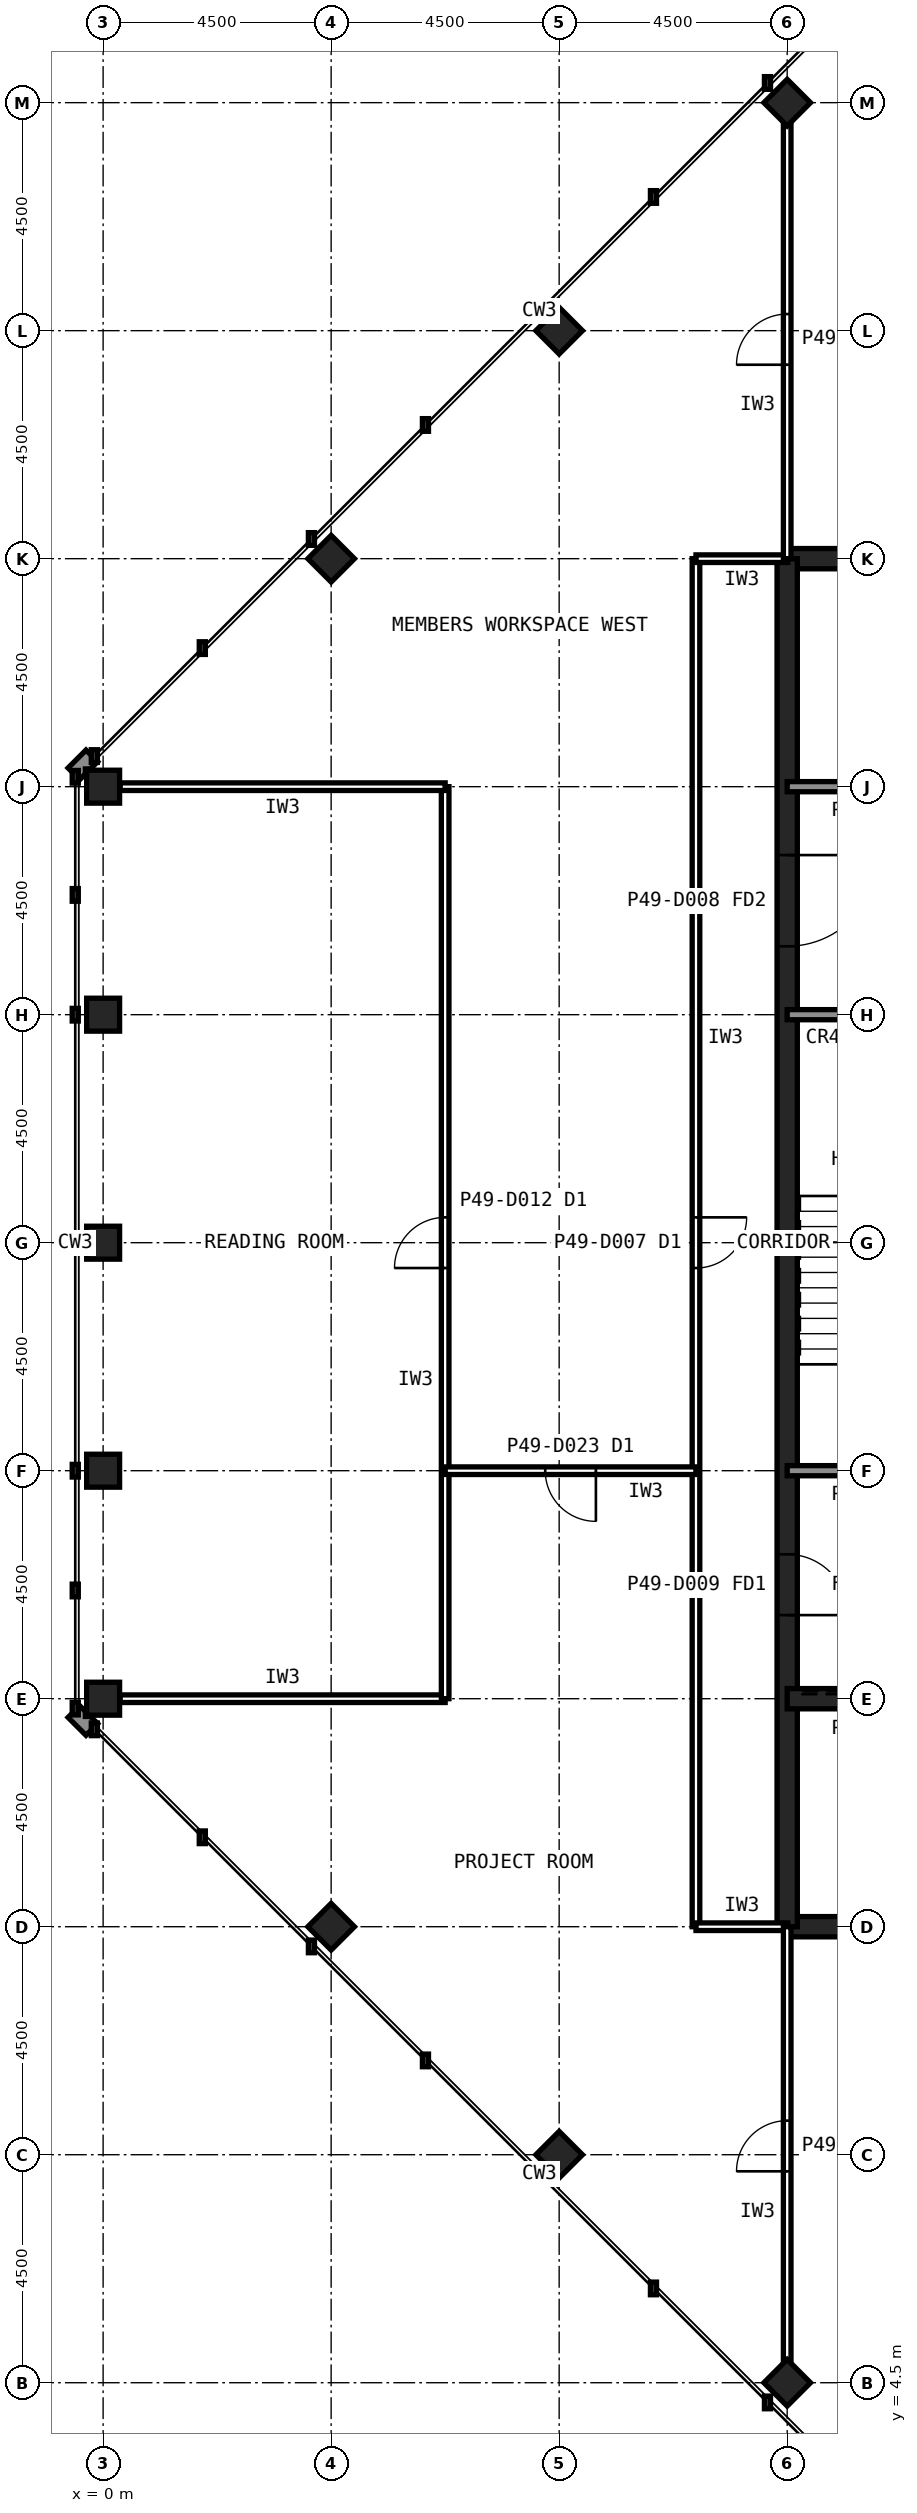
"""IFC4 building model, lengths in metres.
Left out: names, types, materials, properties, quantities, classifications, styles, units other than length and angle.
Written with IfcOpenShell. Run it as: python <this file> out.ifc"""

import sys

from ifc_helpers import new_model, si_unit, direction, frame, frame_2d, origin, origin_2d, place, context, subcontext, project, spatial, rectangle, hollow_rectangle, extrude, element, fill, save


model = new_model("IFC4")
c1 = context("Model", 3, precision=1e-05, world=origin(), true_north=direction((0.0, 1.0)))
c2 = subcontext(c1, "Body", "Model", "MODEL_VIEW")
j1 = project(units=[si_unit("LENGTHUNIT", "METRE"), si_unit("PLANEANGLEUNIT", "RADIAN")], contexts=[c1])
p1 = place(None, origin())
s1 = spatial("IfcSite", under=j1, at=p1, CompositionType="ELEMENT")
p2 = place(p1, origin())
s2 = spatial("IfcBuilding", under=s1, at=p2, CompositionType="ELEMENT")
p3 = place(p2, frame((0.0, 0.0, 210.6)))
s3 = spatial("IfcBuildingStorey", under=s2, at=p3, CompositionType="ELEMENT", Elevation=210.6)
for number, where, z_axis, x_axis in (
    (1, (0.0, 36.0, 0.0), (0.0, 0.0, 1.0), (1.0, 0.0, 0.0)),
    (2, (0.0, 31.5, 0.0), (0.0, 0.0, 1.0), (1.0, 0.0, 0.0)),
    (3, (0.0, 27.0, 0.0), (0.0, 0.0, 1.0), (1.0, 0.0, 0.0)),
    (4, (0.0, 22.5, 0.0), (0.0, 0.0, 1.0), (1.0, 0.0, 0.0)),
    (5, (0.0, 18.0, 0.0), (0.0, 0.0, 1.0), (1.0, 0.0, 0.0)),
    (6, (13.5, 4.5, 0.0), (0.0, 0.0, 1.0), (0.707, 0.707, 0.0)),
    (7, (9.0, 9.0, 0.0), (0.0, 0.0, 1.0), (0.707, 0.707, 0.0)),
    (8, (4.5, 13.5, 0.0), (0.0, 0.0, 1.0), (0.707, 0.707, 0.0)),
    (9, (4.5, 40.5, 0.0), (0.0, 0.0, 1.0), (0.707, 0.707, 0.0)),
    (10, (9.0, 45.0, 0.0), (0.0, 0.0, 1.0), (0.707, 0.707, 0.0)),
    (11, (13.5, 49.5, 0.0), (0.0, 0.0, 1.0), (0.707, 0.707, 0.0)),
):
    element("IfcColumn", number, at=place(p3, frame(where, z_axis=z_axis, x_axis=x_axis)), inside=s3, PredefinedType="COLUMN", context=c2, shape_type="SweptSolid", body=[
        extrude(hollow_rectangle(XDim=0.65, YDim=0.65, WallThickness=0.032, at=origin_2d()), origin(), (0.0, 0.0, 1.0), 4.0),
    ])
for number, where, z_axis, x_axis in (
    (12, (13.5, 13.5, 0.0), (0.0, 0.0, 1.0), (1.0, 0.0, 0.0)),
    (13, (40.5, 40.5, 0.0), (0.0, 0.0, 1.0), (-1.0, 0.0, 0.0)),
):
    element("IfcWall", number, at=place(p3, frame(where, z_axis=z_axis, x_axis=x_axis)), inside=s3, PredefinedType="SHEAR", context=c2, shape_type="SweptSolid", body=[
        extrude(rectangle(XDim=27.0, YDim=0.4, at=frame_2d((13.5, 0.0))), origin(), (0.0, 0.0, 1.0), 4.0),
    ])
p4 = place(p3, frame((13.5, 40.5, 0.0), z_axis=(0.0, 0.0, 1.0), x_axis=(0.0, -1.0, 0.0)))
e14 = element("IfcWall", 14, at=p4, inside=s3, PredefinedType="SHEAR", context=c2, shape_type="SweptSolid", body=[
    extrude(rectangle(XDim=27.0, YDim=0.4, at=frame_2d((13.5, 0.0))), origin(), (0.0, 0.0, 1.0), 4.0),
])
p5 = place(p4, frame((19.65, 0.0, 0.0)))
e15 = element("IfcOpeningElement", 15, at=p5, cuts=e14, PredefinedType="OPENING", context=c2, shape_type="SweptSolid", body=[
    extrude(rectangle(XDim=1.2, YDim=2.1, at=frame_2d((0.6, 1.05))), frame((0.0, 0.21, 0.0), z_axis=(0.0, -1.0, 0.0), x_axis=(1.0, 0.0, 0.0)), (0.0, 0.0, 1.0), 0.42),
])
p6 = place(p4, frame((5.85, 0.0, 0.0)))
e16 = element("IfcOpeningElement", 16, at=p6, cuts=e14, PredefinedType="OPENING", context=c2, shape_type="SweptSolid", body=[
    extrude(rectangle(XDim=1.8, YDim=2.1, at=frame_2d((0.9, 1.05))), frame((0.0, 0.21, 0.0), z_axis=(0.0, -1.0, 0.0), x_axis=(1.0, 0.0, 0.0)), (0.0, 0.0, 1.0), 0.42),
])
p7 = place(p3, frame((13.5, 18.0, 0.0), z_axis=(0.0, 0.0, 1.0), x_axis=(1.0, 0.0, 0.0)))
e17 = element("IfcWall", 17, at=p7, inside=s3, PredefinedType="SHEAR", context=c2, shape_type="SweptSolid", body=[
    extrude(rectangle(XDim=27.0, YDim=0.4, at=frame_2d((13.5, 0.0))), origin(), (0.0, 0.0, 1.0), 4.0),
])
p8 = place(p7, frame((24.3, 0.0, 0.0)))
e18 = element("IfcOpeningElement", 18, at=p8, cuts=e17, PredefinedType="OPENING", context=c2, shape_type="SweptSolid", body=[
    extrude(rectangle(XDim=0.9, YDim=2.1, at=frame_2d((0.45, 1.05))), frame((0.0, 0.21, 0.0), z_axis=(0.0, -1.0, 0.0), x_axis=(1.0, 0.0, 0.0)), (0.0, 0.0, 1.0), 0.42),
])
p9 = place(p7, frame((5.45, 0.0, 0.0)))
e19 = element("IfcOpeningElement", 19, at=p9, cuts=e17, PredefinedType="OPENING", context=c2, shape_type="SweptSolid", body=[
    extrude(rectangle(XDim=1.1, YDim=2.1, at=frame_2d((0.55, 1.05))), frame((0.0, 0.21, 0.0), z_axis=(0.0, -1.0, 0.0), x_axis=(1.0, 0.0, 0.0)), (0.0, 0.0, 1.0), 0.42),
])
p10 = place(p7, frame((8.45, 0.0, 0.0)))
e20 = element("IfcOpeningElement", 20, at=p10, cuts=e17, PredefinedType="OPENING", context=c2, shape_type="SweptSolid", body=[
    extrude(rectangle(XDim=1.1, YDim=2.1, at=frame_2d((0.55, 1.05))), frame((0.0, 0.21, 0.0), z_axis=(0.0, -1.0, 0.0), x_axis=(1.0, 0.0, 0.0)), (0.0, 0.0, 1.0), 0.42),
])
p11 = place(p7, frame((11.45, 0.0, 0.0)))
e21 = element("IfcOpeningElement", 21, at=p11, cuts=e17, PredefinedType="OPENING", context=c2, shape_type="SweptSolid", body=[
    extrude(rectangle(XDim=1.1, YDim=2.1, at=frame_2d((0.55, 1.05))), frame((0.0, 0.21, 0.0), z_axis=(0.0, -1.0, 0.0), x_axis=(1.0, 0.0, 0.0)), (0.0, 0.0, 1.0), 0.42),
])
p12 = place(p7, frame((14.45, 0.0, 0.0)))
e22 = element("IfcOpeningElement", 22, at=p12, cuts=e17, PredefinedType="OPENING", context=c2, shape_type="SweptSolid", body=[
    extrude(rectangle(XDim=1.1, YDim=2.1, at=frame_2d((0.55, 1.05))), frame((0.0, 0.21, 0.0), z_axis=(0.0, -1.0, 0.0), x_axis=(1.0, 0.0, 0.0)), (0.0, 0.0, 1.0), 0.42),
])
p13 = place(p7, frame((17.45, 0.0, 0.0)))
e23 = element("IfcOpeningElement", 23, at=p13, cuts=e17, PredefinedType="OPENING", context=c2, shape_type="SweptSolid", body=[
    extrude(rectangle(XDim=1.1, YDim=2.1, at=frame_2d((0.55, 1.05))), frame((0.0, 0.21, 0.0), z_axis=(0.0, -1.0, 0.0), x_axis=(1.0, 0.0, 0.0)), (0.0, 0.0, 1.0), 0.42),
])
p14 = place(p7, frame((20.45, 0.0, 0.0)))
e24 = element("IfcOpeningElement", 24, at=p14, cuts=e17, PredefinedType="OPENING", context=c2, shape_type="SweptSolid", body=[
    extrude(rectangle(XDim=1.1, YDim=2.1, at=frame_2d((0.55, 1.05))), frame((0.0, 0.21, 0.0), z_axis=(0.0, -1.0, 0.0), x_axis=(1.0, 0.0, 0.0)), (0.0, 0.0, 1.0), 0.42),
])
p15 = place(p7, frame((1.6, 0.0, 0.0)))
e25 = element("IfcOpeningElement", 25, at=p15, cuts=e17, PredefinedType="OPENING", context=c2, shape_type="SweptSolid", body=[
    extrude(rectangle(XDim=1.3, YDim=2.2, at=frame_2d((0.65, 1.1))), frame((0.0, 0.21, 0.0), z_axis=(0.0, -1.0, 0.0), x_axis=(1.0, 0.0, 0.0)), (0.0, 0.0, 1.0), 0.42),
])
p16 = place(p3, frame((13.5, 36.0, 0.0), z_axis=(0.0, 0.0, 1.0), x_axis=(1.0, 0.0, 0.0)))
e26 = element("IfcWall", 26, at=p16, inside=s3, PredefinedType="SOLIDWALL", context=c2, shape_type="SweptSolid", body=[
    extrude(rectangle(XDim=27.0, YDim=0.2, at=frame_2d((13.5, 0.0))), origin(), (0.0, 0.0, 1.0), 3.84),
])
p17 = place(p16, frame((1.8, 0.0, 0.0)))
e27 = element("IfcOpeningElement", 27, at=p17, cuts=e26, PredefinedType="OPENING", context=c2, shape_type="SweptSolid", body=[
    extrude(rectangle(XDim=0.9, YDim=2.1, at=frame_2d((0.45, 1.05))), frame((0.0, 0.11, 0.0), z_axis=(0.0, -1.0, 0.0), x_axis=(1.0, 0.0, 0.0)), (0.0, 0.0, 1.0), 0.22),
])
p18 = place(p16, frame((5.55, 0.0, 0.0)))
e28 = element("IfcOpeningElement", 28, at=p18, cuts=e26, PredefinedType="OPENING", context=c2, shape_type="SweptSolid", body=[
    extrude(rectangle(XDim=0.9, YDim=2.1, at=frame_2d((0.45, 1.05))), frame((0.0, 0.11, 0.0), z_axis=(0.0, -1.0, 0.0), x_axis=(1.0, 0.0, 0.0)), (0.0, 0.0, 1.0), 0.22),
])
p19 = place(p16, frame((8.55, 0.0, 0.0)))
e29 = element("IfcOpeningElement", 29, at=p19, cuts=e26, PredefinedType="OPENING", context=c2, shape_type="SweptSolid", body=[
    extrude(rectangle(XDim=0.9, YDim=2.1, at=frame_2d((0.45, 1.05))), frame((0.0, 0.11, 0.0), z_axis=(0.0, -1.0, 0.0), x_axis=(1.0, 0.0, 0.0)), (0.0, 0.0, 1.0), 0.22),
])
p20 = place(p16, frame((11.55, 0.0, 0.0)))
e30 = element("IfcOpeningElement", 30, at=p20, cuts=e26, PredefinedType="OPENING", context=c2, shape_type="SweptSolid", body=[
    extrude(rectangle(XDim=0.9, YDim=2.1, at=frame_2d((0.45, 1.05))), frame((0.0, 0.11, 0.0), z_axis=(0.0, -1.0, 0.0), x_axis=(1.0, 0.0, 0.0)), (0.0, 0.0, 1.0), 0.22),
])
p21 = place(p16, frame((24.1, 0.0, 0.0)))
e31 = element("IfcOpeningElement", 31, at=p21, cuts=e26, PredefinedType="OPENING", context=c2, shape_type="SweptSolid", body=[
    extrude(rectangle(XDim=1.3, YDim=2.2, at=frame_2d((0.65, 1.1))), frame((0.0, 0.11, 0.0), z_axis=(0.0, -1.0, 0.0), x_axis=(1.0, 0.0, 0.0)), (0.0, 0.0, 1.0), 0.22),
])
p22 = place(p3, frame((13.5, 22.5, 0.0), z_axis=(0.0, 0.0, 1.0), x_axis=(1.0, 0.0, 0.0)))
e32 = element("IfcWall", 32, at=p22, inside=s3, PredefinedType="SOLIDWALL", context=c2, shape_type="SweptSolid", body=[
    extrude(rectangle(XDim=27.0, YDim=0.2, at=frame_2d((13.5, 0.0))), origin(), (0.0, 0.0, 1.0), 3.84),
])
p23 = place(p22, frame((1.65, 0.0, 0.0)))
e33 = element("IfcOpeningElement", 33, at=p23, cuts=e32, PredefinedType="OPENING", context=c2, shape_type="SweptSolid", body=[
    extrude(rectangle(XDim=1.2, YDim=2.1, at=frame_2d((0.6, 1.05))), frame((0.0, 0.11, 0.0), z_axis=(0.0, -1.0, 0.0), x_axis=(1.0, 0.0, 0.0)), (0.0, 0.0, 1.0), 0.22),
])
p24 = place(p22, frame((6.025, 0.0, 0.0)))
e34 = element("IfcOpeningElement", 34, at=p24, cuts=e32, PredefinedType="OPENING", context=c2, shape_type="SweptSolid", body=[
    extrude(rectangle(XDim=1.0, YDim=2.1, at=frame_2d((0.5, 1.05))), frame((0.0, 0.11, 0.0), z_axis=(0.0, -1.0, 0.0), x_axis=(1.0, 0.0, 0.0)), (0.0, 0.0, 1.0), 0.22),
])
p25 = place(p22, frame((10.525, 0.0, 0.0)))
e35 = element("IfcOpeningElement", 35, at=p25, cuts=e32, PredefinedType="OPENING", context=c2, shape_type="SweptSolid", body=[
    extrude(rectangle(XDim=1.0, YDim=2.1, at=frame_2d((0.5, 1.05))), frame((0.0, 0.11, 0.0), z_axis=(0.0, -1.0, 0.0), x_axis=(1.0, 0.0, 0.0)), (0.0, 0.0, 1.0), 0.22),
])
p26 = place(p22, frame((19.75, 0.0, 0.0)))
e36 = element("IfcOpeningElement", 36, at=p26, cuts=e32, PredefinedType="OPENING", context=c2, shape_type="SweptSolid", body=[
    extrude(rectangle(XDim=1.0, YDim=2.1, at=frame_2d((0.5, 1.05))), frame((0.0, 0.11, 0.0), z_axis=(0.0, -1.0, 0.0), x_axis=(1.0, 0.0, 0.0)), (0.0, 0.0, 1.0), 0.22),
])
p27 = place(p22, frame((15.05, 0.0, 0.0)))
e37 = element("IfcOpeningElement", 37, at=p27, cuts=e32, PredefinedType="OPENING", context=c2, shape_type="SweptSolid", body=[
    extrude(rectangle(XDim=1.4, YDim=2.4, at=frame_2d((0.7, 1.2))), frame((0.0, 0.11, 0.0), z_axis=(0.0, -1.0, 0.0), x_axis=(1.0, 0.0, 0.0)), (0.0, 0.0, 1.0), 0.22),
])
p28 = place(p3, frame((13.5, 31.5, 0.0), z_axis=(0.0, 0.0, 1.0), x_axis=(1.0, 0.0, 0.0)))
e38 = element("IfcWall", 38, at=p28, inside=s3, PredefinedType="SOLIDWALL", context=c2, shape_type="SweptSolid", body=[
    extrude(rectangle(XDim=27.0, YDim=0.2, at=frame_2d((13.5, 0.0))), origin(), (0.0, 0.0, 1.0), 3.84),
])
p29 = place(p28, frame((24.15, 0.0, 0.0)))
e39 = element("IfcOpeningElement", 39, at=p29, cuts=e38, PredefinedType="OPENING", context=c2, shape_type="SweptSolid", body=[
    extrude(rectangle(XDim=1.2, YDim=2.1, at=frame_2d((0.6, 1.05))), frame((0.0, 0.11, 0.0), z_axis=(0.0, -1.0, 0.0), x_axis=(1.0, 0.0, 0.0)), (0.0, 0.0, 1.0), 0.22),
])
p30 = place(p28, frame((15.3, 0.0, 0.0)))
e40 = element("IfcOpeningElement", 40, at=p30, cuts=e38, PredefinedType="OPENING", context=c2, shape_type="SweptSolid", body=[
    extrude(rectangle(XDim=0.9, YDim=2.1, at=frame_2d((0.45, 1.05))), frame((0.0, 0.11, 0.0), z_axis=(0.0, -1.0, 0.0), x_axis=(1.0, 0.0, 0.0)), (0.0, 0.0, 1.0), 0.22),
])
p31 = place(p28, frame((19.8, 0.0, 0.0)))
e41 = element("IfcOpeningElement", 41, at=p31, cuts=e38, PredefinedType="OPENING", context=c2, shape_type="SweptSolid", body=[
    extrude(rectangle(XDim=0.9, YDim=2.1, at=frame_2d((0.45, 1.05))), frame((0.0, 0.11, 0.0), z_axis=(0.0, -1.0, 0.0), x_axis=(1.0, 0.0, 0.0)), (0.0, 0.0, 1.0), 0.22),
])
p32 = place(p3, frame((11.7, 40.5, 0.0), z_axis=(0.0, 0.0, 1.0), x_axis=(0.0, -1.0, 0.0)))
e42 = element("IfcWall", 42, at=p32, inside=s3, PredefinedType="PARTITIONING", context=c2, shape_type="SweptSolid", body=[
    extrude(rectangle(XDim=27.0, YDim=0.15, at=frame_2d((13.5, 0.0))), origin(), (0.0, 0.0, 1.0), 3.84),
])
p33 = place(p32, frame((13.0, 0.0, 0.0)))
e43 = element("IfcOpeningElement", 43, at=p33, cuts=e42, PredefinedType="OPENING", context=c2, shape_type="SweptSolid", body=[
    extrude(rectangle(XDim=1.0, YDim=2.1, at=frame_2d((0.5, 1.05))), frame((0.0, 0.085, 0.0), z_axis=(0.0, -1.0, 0.0), x_axis=(1.0, 0.0, 0.0)), (0.0, 0.0, 1.0), 0.17),
])
for number, where, z_axis, x_axis in (
    (44, (11.7, 13.5, 0.0), (0.0, 0.0, 1.0), (1.0, 0.0, 0.0)),
    (45, (13.51, 40.5, 0.0), (0.0, 0.0, 1.0), (-1.0, 0.0, 0.0)),
):
    element("IfcWall", number, at=place(p3, frame(where, z_axis=z_axis, x_axis=x_axis)), inside=s3, PredefinedType="PARTITIONING", context=c2, shape_type="SweptSolid", body=[
        extrude(rectangle(XDim=1.81, YDim=0.15, at=frame_2d((0.905, 0.0))), origin(), (0.0, 0.0, 1.0), 2.989),
    ])
p34 = place(p3, frame((0.335, 18.0, 0.0), z_axis=(0.0, 0.0, 1.0), x_axis=(1.0, 0.0, 0.0)))
e46 = element("IfcWall", 46, at=p34, inside=s3, PredefinedType="PARTITIONING", context=c2, shape_type="SweptSolid", body=[
    extrude(rectangle(XDim=6.415, YDim=0.15, at=frame_2d((3.208, 0.0))), origin(), (0.0, 0.0, 1.0), 2.989),
])
p35 = place(p3, frame((6.75, 18.0, 0.0), z_axis=(0.0, 0.0, 1.0), x_axis=(0.0, 1.0, 0.0)))
e47 = element("IfcWall", 47, at=p35, inside=s3, PredefinedType="PARTITIONING", context=c2, shape_type="SweptSolid", body=[
    extrude(rectangle(XDim=18.0, YDim=0.15, at=frame_2d((9.0, 0.0))), origin(), (0.0, 0.0, 1.0), 3.84),
])
p36 = place(p35, frame((8.5, 0.0, 0.0)))
e48 = element("IfcOpeningElement", 48, at=p36, cuts=e47, PredefinedType="OPENING", context=c2, shape_type="SweptSolid", body=[
    extrude(rectangle(XDim=1.0, YDim=2.1, at=frame_2d((0.5, 1.05))), frame((0.0, 0.085, 0.0), z_axis=(0.0, -1.0, 0.0), x_axis=(1.0, 0.0, 0.0)), (0.0, 0.0, 1.0), 0.17),
])
p37 = place(p3, frame((6.75, 36.0, 0.0), z_axis=(0.0, 0.0, 1.0), x_axis=(-1.0, 0.0, 0.0)))
e49 = element("IfcWall", 49, at=p37, inside=s3, PredefinedType="PARTITIONING", context=c2, shape_type="SweptSolid", body=[
    extrude(rectangle(XDim=6.415, YDim=0.15, at=frame_2d((3.208, 0.0))), origin(), (0.0, 0.0, 1.0), 2.989),
])
p38 = place(p3, frame((13.5, 40.5, 0.0), z_axis=(0.0, 0.0, 1.0), x_axis=(0.0, 1.0, 0.0)))
e50 = element("IfcWall", 50, at=p38, inside=s3, PredefinedType="PARTITIONING", context=c2, shape_type="SweptSolid", body=[
    extrude(rectangle(XDim=8.655, YDim=0.15, at=frame_2d((4.328, 0.0))), origin(), (0.0, 0.0, 1.0), 2.989),
])
p39 = place(p38, frame((3.827, 0.0, 0.0)))
e51 = element("IfcOpeningElement", 51, at=p39, cuts=e50, PredefinedType="OPENING", context=c2, shape_type="SweptSolid", body=[
    extrude(rectangle(XDim=1.0, YDim=2.1, at=frame_2d((0.5, 1.05))), frame((0.0, 0.085, 0.0), z_axis=(0.0, -1.0, 0.0), x_axis=(1.0, 0.0, 0.0)), (0.0, 0.0, 1.0), 0.17),
])
p40 = place(p3, frame((11.7, 22.5, 0.0), z_axis=(0.0, 0.0, 1.0), x_axis=(-1.0, 0.0, 0.0)))
e52 = element("IfcWall", 52, at=p40, inside=s3, PredefinedType="PARTITIONING", context=c2, shape_type="SweptSolid", body=[
    extrude(rectangle(XDim=4.95, YDim=0.15, at=frame_2d((2.475, 0.0))), origin(), (0.0, 0.0, 1.0), 2.989),
])
p41 = place(p40, frame((1.975, 0.0, 0.0)))
e53 = element("IfcOpeningElement", 53, at=p41, cuts=e52, PredefinedType="OPENING", context=c2, shape_type="SweptSolid", body=[
    extrude(rectangle(XDim=1.0, YDim=2.1, at=frame_2d((0.5, 1.05))), frame((0.0, 0.085, 0.0), z_axis=(0.0, -1.0, 0.0), x_axis=(1.0, 0.0, 0.0)), (0.0, 0.0, 1.0), 0.17),
])
p42 = place(p3, frame((13.5, 4.845, 0.0), z_axis=(0.0, 0.0, 1.0), x_axis=(0.0, 1.0, 0.0)))
e54 = element("IfcWall", 54, at=p42, inside=s3, PredefinedType="PARTITIONING", context=c2, shape_type="SweptSolid", body=[
    extrude(rectangle(XDim=8.655, YDim=0.15, at=frame_2d((4.328, 0.0))), origin(), (0.0, 0.0, 1.0), 2.989),
])
p43 = place(p42, frame((3.827, 0.0, 0.0)))
e55 = element("IfcOpeningElement", 55, at=p43, cuts=e54, PredefinedType="OPENING", context=c2, shape_type="SweptSolid", body=[
    extrude(rectangle(XDim=1.0, YDim=2.1, at=frame_2d((0.5, 1.05))), frame((0.0, 0.085, 0.0), z_axis=(0.0, -1.0, 0.0), x_axis=(1.0, 0.0, 0.0)), (0.0, 0.0, 1.0), 0.17),
])
p44 = place(p5, origin())
e56 = element("IfcDoor", 56, at=p44, inside=s3, OperationType="SINGLE_SWING_RIGHT", PredefinedType="DOOR", context=c2, shape_type="SweptSolid", body=[
    extrude(rectangle(XDim=1.2, YDim=2.1, at=frame_2d((0.6, 1.05))), frame((0.0, 0.025, 0.0), z_axis=(0.0, -1.0, 0.0), x_axis=(1.0, 0.0, 0.0)), (0.0, 0.0, 1.0), 0.05),
])
fill(e15, e56)
p45 = place(p6, origin())
e57 = element("IfcDoor", 57, at=p45, inside=s3, OperationType="SINGLE_SWING_LEFT", PredefinedType="DOOR", context=c2, shape_type="SweptSolid", body=[
    extrude(rectangle(XDim=1.8, YDim=2.1, at=frame_2d((0.9, 1.05))), frame((0.0, 0.025, 0.0), z_axis=(0.0, -1.0, 0.0), x_axis=(1.0, 0.0, 0.0)), (0.0, 0.0, 1.0), 0.05),
])
fill(e16, e57)
p46 = place(p33, origin())
e58 = element("IfcDoor", 58, at=p46, inside=s3, OperationType="SINGLE_SWING_LEFT", PredefinedType="DOOR", context=c2, shape_type="SweptSolid", body=[
    extrude(rectangle(XDim=1.0, YDim=2.1, at=frame_2d((0.5, 1.05))), frame((0.0, 0.025, 0.0), z_axis=(0.0, -1.0, 0.0), x_axis=(1.0, 0.0, 0.0)), (0.0, 0.0, 1.0), 0.05),
])
fill(e43, e58)
p47 = place(p36, origin())
e59 = element("IfcDoor", 59, at=p47, inside=s3, OperationType="SINGLE_SWING_LEFT", PredefinedType="DOOR", context=c2, shape_type="SweptSolid", body=[
    extrude(rectangle(XDim=1.0, YDim=2.1, at=frame_2d((0.5, 1.05))), frame((0.0, 0.025, 0.0), z_axis=(0.0, -1.0, 0.0), x_axis=(1.0, 0.0, 0.0)), (0.0, 0.0, 1.0), 0.05),
])
fill(e48, e59)
p48 = place(p39, origin())
e60 = element("IfcDoor", 60, at=p48, inside=s3, OperationType="SINGLE_SWING_LEFT", PredefinedType="DOOR", context=c2, shape_type="SweptSolid", body=[
    extrude(rectangle(XDim=1.0, YDim=2.1, at=frame_2d((0.5, 1.05))), frame((0.0, 0.025, 0.0), z_axis=(0.0, -1.0, 0.0), x_axis=(1.0, 0.0, 0.0)), (0.0, 0.0, 1.0), 0.05),
])
fill(e51, e60)
p49 = place(p41, origin())
e61 = element("IfcDoor", 61, at=p49, inside=s3, OperationType="SINGLE_SWING_LEFT", PredefinedType="DOOR", context=c2, shape_type="SweptSolid", body=[
    extrude(rectangle(XDim=1.0, YDim=2.1, at=frame_2d((0.5, 1.05))), frame((0.0, 0.025, 0.0), z_axis=(0.0, -1.0, 0.0), x_axis=(1.0, 0.0, 0.0)), (0.0, 0.0, 1.0), 0.05),
])
fill(e53, e61)
p50 = place(p43, origin())
e62 = element("IfcDoor", 62, at=p50, inside=s3, OperationType="SINGLE_SWING_LEFT", PredefinedType="DOOR", context=c2, shape_type="SweptSolid", body=[
    extrude(rectangle(XDim=1.0, YDim=2.1, at=frame_2d((0.5, 1.05))), frame((0.0, 0.025, 0.0), z_axis=(0.0, -1.0, 0.0), x_axis=(1.0, 0.0, 0.0)), (0.0, 0.0, 1.0), 0.05),
])
fill(e55, e62)
save(model, sys.argv[1])
